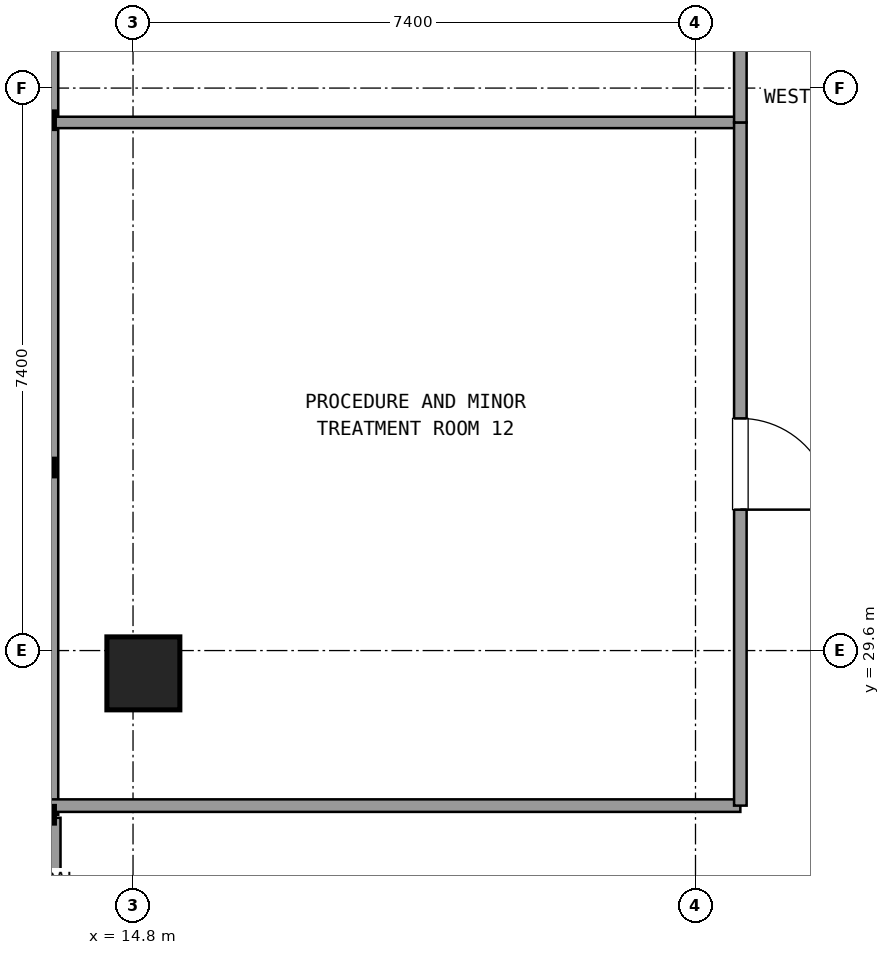
"""IFC4 building model, lengths in metres.
Left out: names, types, materials, properties, quantities, classifications, styles, units other than length and angle.
Written with IfcOpenShell. Run it as: python <this file> out.ifc"""

import sys

from ifc_helpers import new_model, si_unit, direction, frame, frame_2d, origin, origin_2d, place, context, subcontext, project, spatial, rectangle, extrude, element, fill, save


model = new_model("IFC4")
c1 = context("Model", 3, precision=1e-05, world=origin(), true_north=direction((0.0, 1.0)))
c2 = subcontext(c1, "Body", "Model", "MODEL_VIEW")
j1 = project(units=[si_unit("LENGTHUNIT", "METRE"), si_unit("PLANEANGLEUNIT", "RADIAN")], contexts=[c1])
p1 = place(None, origin())
s1 = spatial("IfcSite", under=j1, at=p1, CompositionType="ELEMENT")
p2 = place(p1, origin())
s2 = spatial("IfcBuilding", under=s1, at=p2, CompositionType="ELEMENT")
p3 = place(p2, frame((0.0, 0.0, 134.82)))
s3 = spatial("IfcBuildingStorey", under=s2, at=p3, CompositionType="ELEMENT", Elevation=134.82)
p4 = place(p3, frame((14.936, 29.3, 0.0), z_axis=(0.0, 0.0, 1.0), x_axis=(1.0, 0.0, 0.0)))
e1 = element("IfcColumn", 1, at=p4, inside=s3, PredefinedType="COLUMN", context=c2, shape_type="SweptSolid", body=[
    extrude(rectangle(XDim=0.96, YDim=0.96, at=origin_2d()), origin(), (0.0, 0.0, 1.0), 3.6),
])
p5 = place(p3, frame((13.696, 27.4, 0.0), z_axis=(0.0, 0.0, 1.0), x_axis=(0.0, -1.0, 0.0)))
e2 = element("IfcWall", 2, at=p5, inside=s3, PredefinedType="SOLIDWALL", context=c2, shape_type="SweptSolid", body=[
    extrude(rectangle(XDim=3.0, YDim=0.3, at=frame_2d((1.5, 0.0))), origin(), (0.0, 0.0, 1.0), 2.67),
])
p6 = place(p5, frame((0.9, 0.0, 0.0)))
e3 = element("IfcOpeningElement", 3, at=p6, cuts=e2, PredefinedType="OPENING", context=c2, shape_type="SweptSolid", body=[
    extrude(rectangle(XDim=1.2, YDim=2.2, at=frame_2d((0.6, 1.1))), frame((0.0, 0.16, 0.0), z_axis=(0.0, -1.0, 0.0), x_axis=(1.0, 0.0, 0.0)), (0.0, 0.0, 1.0), 0.32),
])
p7 = place(p3, frame((13.696, 41.145, 0.0), z_axis=(0.0, 0.0, 1.0), x_axis=(0.0, -1.0, 0.0)))
e4 = element("IfcWall", 4, at=p7, inside=s3, PredefinedType="SOLIDWALL", context=c2, shape_type="SweptSolid", body=[
    extrude(rectangle(XDim=13.705, YDim=0.24, at=frame_2d((6.853, 0.0))), origin(), (0.0, 0.0, 1.0), 0.85),
])
p8 = place(p3, frame((13.716, 27.56, 0.0), z_axis=(0.0, 0.0, 1.0), x_axis=(1.0, 0.0, 0.0)))
e5 = element("IfcWall", 5, at=p8, inside=s3, PredefinedType="PARTITIONING", context=c2, shape_type="SweptSolid", body=[
    extrude(rectangle(XDim=9.074, YDim=0.165, at=frame_2d((4.537, 0.0))), origin(), (0.0, 0.0, 1.0), 2.61),
])
p9 = place(p3, frame((22.79, 36.548, 0.0), z_axis=(0.0, 0.0, 1.0), x_axis=(-1.0, 0.0, 0.0)))
e6 = element("IfcWall", 6, at=p9, inside=s3, PredefinedType="PARTITIONING", context=c2, shape_type="SweptSolid", body=[
    extrude(rectangle(XDim=9.074, YDim=0.15, at=frame_2d((4.537, 0.0))), origin(), (0.0, 0.0, 1.0), 2.61),
])
p10 = place(p3, frame((22.79, 27.56, 0.0), z_axis=(0.0, 0.0, 1.0), x_axis=(0.0, 1.0, 0.0)))
e7 = element("IfcWall", 7, at=p10, inside=s3, PredefinedType="PARTITIONING", context=c2, shape_type="SweptSolid", body=[
    extrude(rectangle(XDim=8.988, YDim=0.165, at=frame_2d((4.494, 0.0))), origin(), (0.0, 0.0, 1.0), 2.61),
])
p11 = place(p10, frame((3.894, 0.0, 0.0)))
e8 = element("IfcOpeningElement", 8, at=p11, cuts=e7, PredefinedType="OPENING", context=c2, shape_type="SweptSolid", body=[
    extrude(rectangle(XDim=1.2, YDim=2.15, at=frame_2d((0.6, 1.075))), frame((0.0, 0.093, 0.0), z_axis=(0.0, -1.0, 0.0), x_axis=(1.0, 0.0, 0.0)), (0.0, 0.0, 1.0), 0.185),
])
p12 = place(p3, frame((22.79, 36.548, 0.0), z_axis=(0.0, 0.0, 1.0), x_axis=(0.0, 1.0, 0.0)))
e9 = element("IfcWall", 9, at=p12, inside=s3, PredefinedType="PARTITIONING", context=c2, shape_type="SweptSolid", body=[
    extrude(rectangle(XDim=10.552, YDim=0.165, at=frame_2d((5.276, 0.0))), origin(), (0.0, 0.0, 1.0), 2.61),
])
p13 = place(p12, frame((4.676, 0.0, 0.0)))
e10 = element("IfcOpeningElement", 10, at=p13, cuts=e9, PredefinedType="OPENING", context=c2, shape_type="SweptSolid", body=[
    extrude(rectangle(XDim=1.2, YDim=2.15, at=frame_2d((0.6, 1.075))), frame((0.0, 0.093, 0.0), z_axis=(0.0, -1.0, 0.0), x_axis=(1.0, 0.0, 0.0)), (0.0, 0.0, 1.0), 0.185),
])
p14 = place(p11, frame((1.2, 0.0, 0.0), z_axis=(0.0, 0.0, 1.0), x_axis=(-1.0, 0.0, 0.0)))
e11 = element("IfcDoor", 11, at=p14, inside=s3, OperationType="SINGLE_SWING_LEFT", PredefinedType="DOOR", context=c2, shape_type="SweptSolid", body=[
    extrude(rectangle(XDim=1.2, YDim=2.15, at=frame_2d((0.6, 1.075))), frame((0.0, 0.025, 0.0), z_axis=(0.0, -1.0, 0.0), x_axis=(1.0, 0.0, 0.0)), (0.0, 0.0, 1.0), 0.05),
])
fill(e8, e11)
save(model, sys.argv[1])
